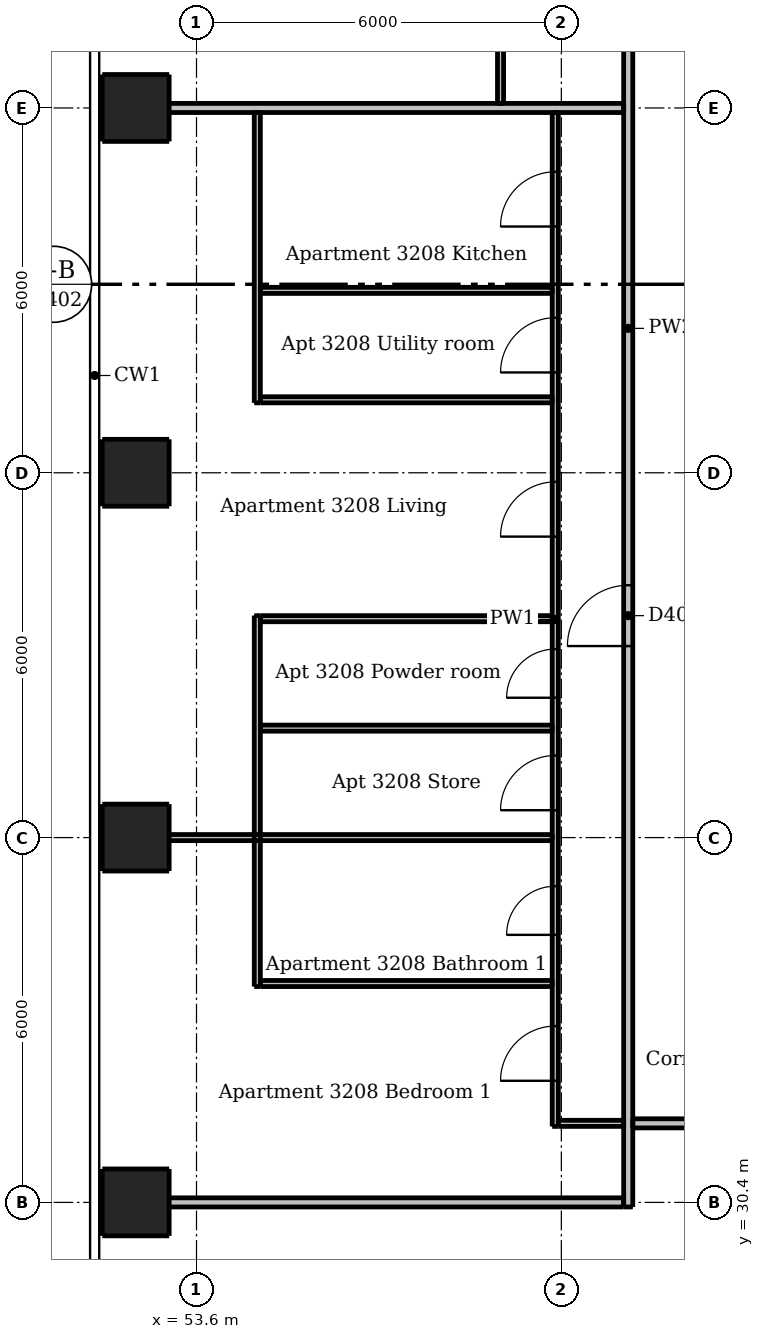
"""IFC4 building model, lengths in metres.
Left out: names, types, materials, properties, quantities, classifications, styles, units other than length and angle.
Written with IfcOpenShell. Run it as: python <this file> out.ifc"""

import sys

from ifc_helpers import new_model, si_unit, direction, frame, frame_2d, origin, origin_2d, place, context, subcontext, project, spatial, rectangle, extrude, element, fill, save


model = new_model("IFC4")
c1 = context("Model", 3, precision=1e-05, world=origin(), true_north=direction((0.0, 1.0)))
c2 = subcontext(c1, "Body", "Model", "MODEL_VIEW")
j1 = project(units=[si_unit("LENGTHUNIT", "METRE"), si_unit("PLANEANGLEUNIT", "RADIAN")], contexts=[c1])
p1 = place(None, origin())
s1 = spatial("IfcSite", under=j1, at=p1, CompositionType="ELEMENT")
p2 = place(p1, origin())
s2 = spatial("IfcBuilding", under=s1, at=p2, CompositionType="ELEMENT")
p3 = place(p2, frame((0.0, 0.0, 118.3)))
s3 = spatial("IfcBuildingStorey", under=s2, at=p3, CompositionType="ELEMENT", Elevation=118.3)
for number, where, z_axis, x_axis in (
    (1, (52.6, 30.4, 0.0), (0.0, 0.0, 1.0), (1.0, 0.0, 0.0)),
    (2, (52.6, 36.4, 0.0), (0.0, 0.0, 1.0), (1.0, 0.0, 0.0)),
    (3, (52.6, 42.4, 0.0), (0.0, 0.0, 1.0), (1.0, 0.0, 0.0)),
    (4, (52.6, 48.4, 0.0), (0.0, 0.0, 1.0), (1.0, 0.0, 0.0)),
):
    element("IfcColumn", number, at=place(p3, frame(where, z_axis=z_axis, x_axis=x_axis)), inside=s3, PredefinedType="COLUMN", context=c2, shape_type="SweptSolid", body=[
        extrude(rectangle(XDim=1.1, YDim=1.1, at=origin_2d()), origin(), (0.0, 0.0, 1.0), 3.05),
    ])
p4 = place(p3, frame((54.6, 33.95, 0.0), z_axis=(0.0, 0.0, 1.0), x_axis=(0.0, 1.0, 0.0)))
e5 = element("IfcWall", 5, at=p4, inside=s3, PredefinedType="PARTITIONING", context=c2, shape_type="SweptSolid", body=[
    extrude(rectangle(XDim=6.1, YDim=0.1, at=frame_2d((3.05, 0.0))), origin(), (0.0, 0.0, 1.0), 3.05),
])
p5 = place(p3, frame((54.6, 43.55, 0.0), z_axis=(0.0, 0.0, 1.0), x_axis=(0.0, 1.0, 0.0)))
e6 = element("IfcWall", 6, at=p5, inside=s3, PredefinedType="PARTITIONING", context=c2, shape_type="SweptSolid", body=[
    extrude(rectangle(XDim=4.775, YDim=0.1, at=frame_2d((2.387, 0.0))), origin(), (0.0, 0.0, 1.0), 3.05),
])
p6 = place(p3, frame((58.6, 54.35, 0.0), z_axis=(0.0, 0.0, 1.0), x_axis=(0.0, -1.0, 0.0)))
e7 = element("IfcWall", 7, at=p6, inside=s3, PredefinedType="PARTITIONING", context=c2, shape_type="SweptSolid", body=[
    extrude(rectangle(XDim=5.875, YDim=0.1, at=frame_2d((2.938, 0.0))), origin(), (0.0, 0.0, 1.0), 3.05),
])
p7 = place(p6, frame((3.75, 0.0, 0.0)))
e8 = element("IfcOpeningElement", 8, at=p7, cuts=e7, PredefinedType="OPENING", context=c2, shape_type="SweptSolid", body=[
    extrude(rectangle(XDim=0.8, YDim=2.1, at=frame_2d((0.4, 1.05))), frame((0.0, 0.06, 0.0), z_axis=(0.0, -1.0, 0.0), x_axis=(1.0, 0.0, 0.0)), (0.0, 0.0, 1.0), 0.12),
])
p8 = place(p3, frame((59.5, 31.65, 0.0), z_axis=(0.0, 0.0, 1.0), x_axis=(0.0, 1.0, 0.0)))
e9 = element("IfcWall", 9, at=p8, inside=s3, PredefinedType="PARTITIONING", context=c2, shape_type="SweptSolid", body=[
    extrude(rectangle(XDim=16.675, YDim=0.1, at=frame_2d((8.337, 0.0))), origin(), (0.0, 0.0, 1.0), 2.51),
])
p9 = place(p8, frame((9.7, 0.0, 0.0)))
e10 = element("IfcOpeningElement", 10, at=p9, cuts=e9, PredefinedType="OPENING", context=c2, shape_type="SweptSolid", body=[
    extrude(rectangle(XDim=0.9, YDim=2.1, at=frame_2d((0.45, 1.05))), frame((0.0, 0.06, 0.0), z_axis=(0.0, -1.0, 0.0), x_axis=(1.0, 0.0, 0.0)), (0.0, 0.0, 1.0), 0.12),
])
p10 = place(p8, frame((14.8, 0.0, 0.0)))
e11 = element("IfcOpeningElement", 11, at=p10, cuts=e9, PredefinedType="OPENING", context=c2, shape_type="SweptSolid", body=[
    extrude(rectangle(XDim=0.9, YDim=2.1, at=frame_2d((0.45, 1.05))), frame((0.0, 0.06, 0.0), z_axis=(0.0, -1.0, 0.0), x_axis=(1.0, 0.0, 0.0)), (0.0, 0.0, 1.0), 0.12),
])
p11 = place(p8, frame((12.4, 0.0, 0.0)))
e12 = element("IfcOpeningElement", 12, at=p11, cuts=e9, PredefinedType="OPENING", context=c2, shape_type="SweptSolid", body=[
    extrude(rectangle(XDim=0.9, YDim=2.1, at=frame_2d((0.45, 1.05))), frame((0.0, 0.06, 0.0), z_axis=(0.0, -1.0, 0.0), x_axis=(1.0, 0.0, 0.0)), (0.0, 0.0, 1.0), 0.12),
])
p12 = place(p8, frame((5.2, 0.0, 0.0)))
e13 = element("IfcOpeningElement", 13, at=p12, cuts=e9, PredefinedType="OPENING", context=c2, shape_type="SweptSolid", body=[
    extrude(rectangle(XDim=0.9, YDim=2.1, at=frame_2d((0.45, 1.05))), frame((0.0, 0.06, 0.0), z_axis=(0.0, -1.0, 0.0), x_axis=(1.0, 0.0, 0.0)), (0.0, 0.0, 1.0), 0.12),
])
p13 = place(p8, frame((7.05, 0.0, 0.0)))
e14 = element("IfcOpeningElement", 14, at=p13, cuts=e9, PredefinedType="OPENING", context=c2, shape_type="SweptSolid", body=[
    extrude(rectangle(XDim=0.8, YDim=2.1, at=frame_2d((0.4, 1.05))), frame((0.0, 0.06, 0.0), z_axis=(0.0, -1.0, 0.0), x_axis=(1.0, 0.0, 0.0)), (0.0, 0.0, 1.0), 0.12),
])
p14 = place(p8, frame((0.75, 0.0, 0.0)))
e15 = element("IfcOpeningElement", 15, at=p14, cuts=e9, PredefinedType="OPENING", context=c2, shape_type="SweptSolid", body=[
    extrude(rectangle(XDim=0.9, YDim=2.1, at=frame_2d((0.45, 1.05))), frame((0.0, 0.06, 0.0), z_axis=(0.0, -1.0, 0.0), x_axis=(1.0, 0.0, 0.0)), (0.0, 0.0, 1.0), 0.12),
])
p15 = place(p8, frame((3.15, 0.0, 0.0)))
e16 = element("IfcOpeningElement", 16, at=p15, cuts=e9, PredefinedType="OPENING", context=c2, shape_type="SweptSolid", body=[
    extrude(rectangle(XDim=0.8, YDim=2.1, at=frame_2d((0.4, 1.05))), frame((0.0, 0.06, 0.0), z_axis=(0.0, -1.0, 0.0), x_axis=(1.0, 0.0, 0.0)), (0.0, 0.0, 1.0), 0.12),
])
for number, where, z_axis, x_axis in (
    (17, (54.65, 45.4, 0.0), (0.0, 0.0, 1.0), (1.0, 0.0, 0.0)),
    (18, (54.65, 43.6, 0.0), (0.0, 0.0, 1.0), (1.0, 0.0, 0.0)),
    (19, (54.65, 40.0, 0.0), (0.0, 0.0, 1.0), (1.0, 0.0, 0.0)),
    (20, (54.65, 38.2, 0.0), (0.0, 0.0, 1.0), (1.0, 0.0, 0.0)),
):
    element("IfcWall", number, at=place(p3, frame(where, z_axis=z_axis, x_axis=x_axis)), inside=s3, PredefinedType="PARTITIONING", context=c2, shape_type="SweptSolid", body=[
        extrude(rectangle(XDim=4.8, YDim=0.1, at=frame_2d((2.4, 0.0))), origin(), (0.0, 0.0, 1.0), 3.05),
    ])
p16 = place(p3, frame((52.0, 36.4, 0.0), z_axis=(0.0, 0.0, 1.0), x_axis=(1.0, 0.0, 0.0)))
e21 = element("IfcWall", 21, at=p16, inside=s3, PredefinedType="PARTITIONING", context=c2, shape_type="SweptSolid", body=[
    extrude(rectangle(XDim=7.45, YDim=0.1, at=frame_2d((3.725, 0.0))), origin(), (0.0, 0.0, 1.0), 2.516),
])
p17 = place(p3, frame((54.65, 34.0, 0.0), z_axis=(0.0, 0.0, 1.0), x_axis=(1.0, 0.0, 0.0)))
e22 = element("IfcWall", 22, at=p17, inside=s3, PredefinedType="PARTITIONING", context=c2, shape_type="SweptSolid", body=[
    extrude(rectangle(XDim=4.8, YDim=0.1, at=frame_2d((2.4, 0.0))), origin(), (0.0, 0.0, 1.0), 3.05),
])
p18 = place(p3, frame((59.55, 31.7, 0.0), z_axis=(0.0, 0.0, 1.0), x_axis=(1.0, 0.0, 0.0)))
e23 = element("IfcWall", 23, at=p18, inside=s3, PredefinedType="PARTITIONING", context=c2, shape_type="SweptSolid", body=[
    extrude(rectangle(XDim=1.075, YDim=0.1, at=frame_2d((0.538, 0.0))), origin(), (0.0, 0.0, 1.0), 3.05),
])
p19 = place(p3, frame((60.7, 30.325, 0.0), z_axis=(0.0, 0.0, 1.0), x_axis=(0.0, 1.0, 0.0)))
e24 = element("IfcWall", 24, at=p19, inside=s3, PredefinedType="PARTITIONING", context=c2, shape_type="SweptSolid", body=[
    extrude(rectangle(XDim=28.9, YDim=0.15, at=frame_2d((14.45, 0.0))), origin(), (0.0, 0.0, 1.0), 3.05),
])
p20 = place(p19, frame((9.225, 0.0, 0.0)))
e25 = element("IfcOpeningElement", 25, at=p20, cuts=e24, PredefinedType="OPENING", context=c2, shape_type="SweptSolid", body=[
    extrude(rectangle(XDim=1.0, YDim=2.1, at=frame_2d((0.5, 1.05))), frame((0.0, 0.085, 0.0), z_axis=(0.0, -1.0, 0.0), x_axis=(1.0, 0.0, 0.0)), (0.0, 0.0, 1.0), 0.17),
])
p21 = place(p19, frame((26.025, 0.0, 0.0)))
e26 = element("IfcOpeningElement", 26, at=p21, cuts=e24, PredefinedType="OPENING", context=c2, shape_type="SweptSolid", body=[
    extrude(rectangle(XDim=1.0, YDim=2.1, at=frame_2d((0.5, 1.05))), frame((0.0, 0.085, 0.0), z_axis=(0.0, -1.0, 0.0), x_axis=(1.0, 0.0, 0.0)), (0.0, 0.0, 1.0), 0.17),
])
p22 = place(p3, frame((52.0, 48.4, 0.0), z_axis=(0.0, 0.0, 1.0), x_axis=(1.0, 0.0, 0.0)))
e27 = element("IfcWall", 27, at=p22, inside=s3, PredefinedType="PARTITIONING", context=c2, shape_type="SweptSolid", body=[
    extrude(rectangle(XDim=8.625, YDim=0.15, at=frame_2d((4.312, 0.0))), origin(), (0.0, 0.0, 1.0), 2.516),
])
p23 = place(p3, frame((89.525, 31.7, 0.0), z_axis=(0.0, 0.0, 1.0), x_axis=(-1.0, 0.0, 0.0)))
e28 = element("IfcWall", 28, at=p23, inside=s3, PredefinedType="PARTITIONING", context=c2, shape_type="SweptSolid", body=[
    extrude(rectangle(XDim=28.75, YDim=0.15, at=frame_2d((14.375, 0.0))), origin(), (0.0, 0.0, 1.0), 3.05),
])
p24 = place(p23, frame((24.625, 0.0, 0.0)))
e29 = element("IfcOpeningElement", 29, at=p24, cuts=e28, PredefinedType="OPENING", context=c2, shape_type="SweptSolid", body=[
    extrude(rectangle(XDim=1.0, YDim=2.1, at=frame_2d((0.5, 1.05))), frame((0.0, 0.085, 0.0), z_axis=(0.0, -1.0, 0.0), x_axis=(1.0, 0.0, 0.0)), (0.0, 0.0, 1.0), 0.17),
])
p25 = place(p23, frame((5.425, 0.0, 0.0)))
e30 = element("IfcOpeningElement", 30, at=p25, cuts=e28, PredefinedType="OPENING", context=c2, shape_type="SweptSolid", body=[
    extrude(rectangle(XDim=1.0, YDim=2.1, at=frame_2d((0.5, 1.05))), frame((0.0, 0.085, 0.0), z_axis=(0.0, -1.0, 0.0), x_axis=(1.0, 0.0, 0.0)), (0.0, 0.0, 1.0), 0.17),
])
p26 = place(p3, frame((52.0, 30.4, 0.0), z_axis=(0.0, 0.0, 1.0), x_axis=(1.0, 0.0, 0.0)))
e31 = element("IfcWall", 31, at=p26, inside=s3, PredefinedType="PARTITIONING", context=c2, shape_type="SweptSolid", body=[
    extrude(rectangle(XDim=8.625, YDim=0.15, at=frame_2d((4.312, 0.0))), origin(), (0.0, 0.0, 1.0), 2.647),
])
p27 = place(p20, origin())
e32 = element("IfcDoor", 32, at=p27, inside=s3, OperationType="SINGLE_SWING_LEFT", PredefinedType="DOOR", context=c2, shape_type="SweptSolid", body=[
    extrude(rectangle(XDim=1.0, YDim=2.1, at=frame_2d((0.5, 1.05))), frame((0.0, 0.025, 0.0), z_axis=(0.0, -1.0, 0.0), x_axis=(1.0, 0.0, 0.0)), (0.0, 0.0, 1.0), 0.05),
])
fill(e25, e32)
p28 = place(p9, origin())
e33 = element("IfcDoor", 33, at=p28, inside=s3, OperationType="SINGLE_SWING_LEFT", PredefinedType="DOOR", context=c2, shape_type="SweptSolid", body=[
    extrude(rectangle(XDim=0.9, YDim=2.1, at=frame_2d((0.45, 1.05))), frame((0.0, 0.025, 0.0), z_axis=(0.0, -1.0, 0.0), x_axis=(1.0, 0.0, 0.0)), (0.0, 0.0, 1.0), 0.05),
])
fill(e10, e33)
p29 = place(p10, origin())
e34 = element("IfcDoor", 34, at=p29, inside=s3, OperationType="SINGLE_SWING_LEFT", PredefinedType="DOOR", context=c2, shape_type="SweptSolid", body=[
    extrude(rectangle(XDim=0.9, YDim=2.1, at=frame_2d((0.45, 1.05))), frame((0.0, 0.025, 0.0), z_axis=(0.0, -1.0, 0.0), x_axis=(1.0, 0.0, 0.0)), (0.0, 0.0, 1.0), 0.05),
])
fill(e11, e34)
p30 = place(p11, origin())
e35 = element("IfcDoor", 35, at=p30, inside=s3, OperationType="SINGLE_SWING_LEFT", PredefinedType="DOOR", context=c2, shape_type="SweptSolid", body=[
    extrude(rectangle(XDim=0.9, YDim=2.1, at=frame_2d((0.45, 1.05))), frame((0.0, 0.025, 0.0), z_axis=(0.0, -1.0, 0.0), x_axis=(1.0, 0.0, 0.0)), (0.0, 0.0, 1.0), 0.05),
])
fill(e12, e35)
p31 = place(p12, origin())
e36 = element("IfcDoor", 36, at=p31, inside=s3, OperationType="SINGLE_SWING_LEFT", PredefinedType="DOOR", context=c2, shape_type="SweptSolid", body=[
    extrude(rectangle(XDim=0.9, YDim=2.1, at=frame_2d((0.45, 1.05))), frame((0.0, 0.025, 0.0), z_axis=(0.0, -1.0, 0.0), x_axis=(1.0, 0.0, 0.0)), (0.0, 0.0, 1.0), 0.05),
])
fill(e13, e36)
p32 = place(p13, origin())
e37 = element("IfcDoor", 37, at=p32, inside=s3, OperationType="SINGLE_SWING_LEFT", PredefinedType="DOOR", context=c2, shape_type="SweptSolid", body=[
    extrude(rectangle(XDim=0.8, YDim=2.1, at=frame_2d((0.4, 1.05))), frame((0.0, 0.025, 0.0), z_axis=(0.0, -1.0, 0.0), x_axis=(1.0, 0.0, 0.0)), (0.0, 0.0, 1.0), 0.05),
])
fill(e14, e37)
p33 = place(p14, origin())
e38 = element("IfcDoor", 38, at=p33, inside=s3, OperationType="SINGLE_SWING_LEFT", PredefinedType="DOOR", context=c2, shape_type="SweptSolid", body=[
    extrude(rectangle(XDim=0.9, YDim=2.1, at=frame_2d((0.45, 1.05))), frame((0.0, 0.025, 0.0), z_axis=(0.0, -1.0, 0.0), x_axis=(1.0, 0.0, 0.0)), (0.0, 0.0, 1.0), 0.05),
])
fill(e15, e38)
p34 = place(p15, origin())
e39 = element("IfcDoor", 39, at=p34, inside=s3, OperationType="SINGLE_SWING_LEFT", PredefinedType="DOOR", context=c2, shape_type="SweptSolid", body=[
    extrude(rectangle(XDim=0.8, YDim=2.1, at=frame_2d((0.4, 1.05))), frame((0.0, 0.025, 0.0), z_axis=(0.0, -1.0, 0.0), x_axis=(1.0, 0.0, 0.0)), (0.0, 0.0, 1.0), 0.05),
])
fill(e16, e39)
save(model, sys.argv[1])
